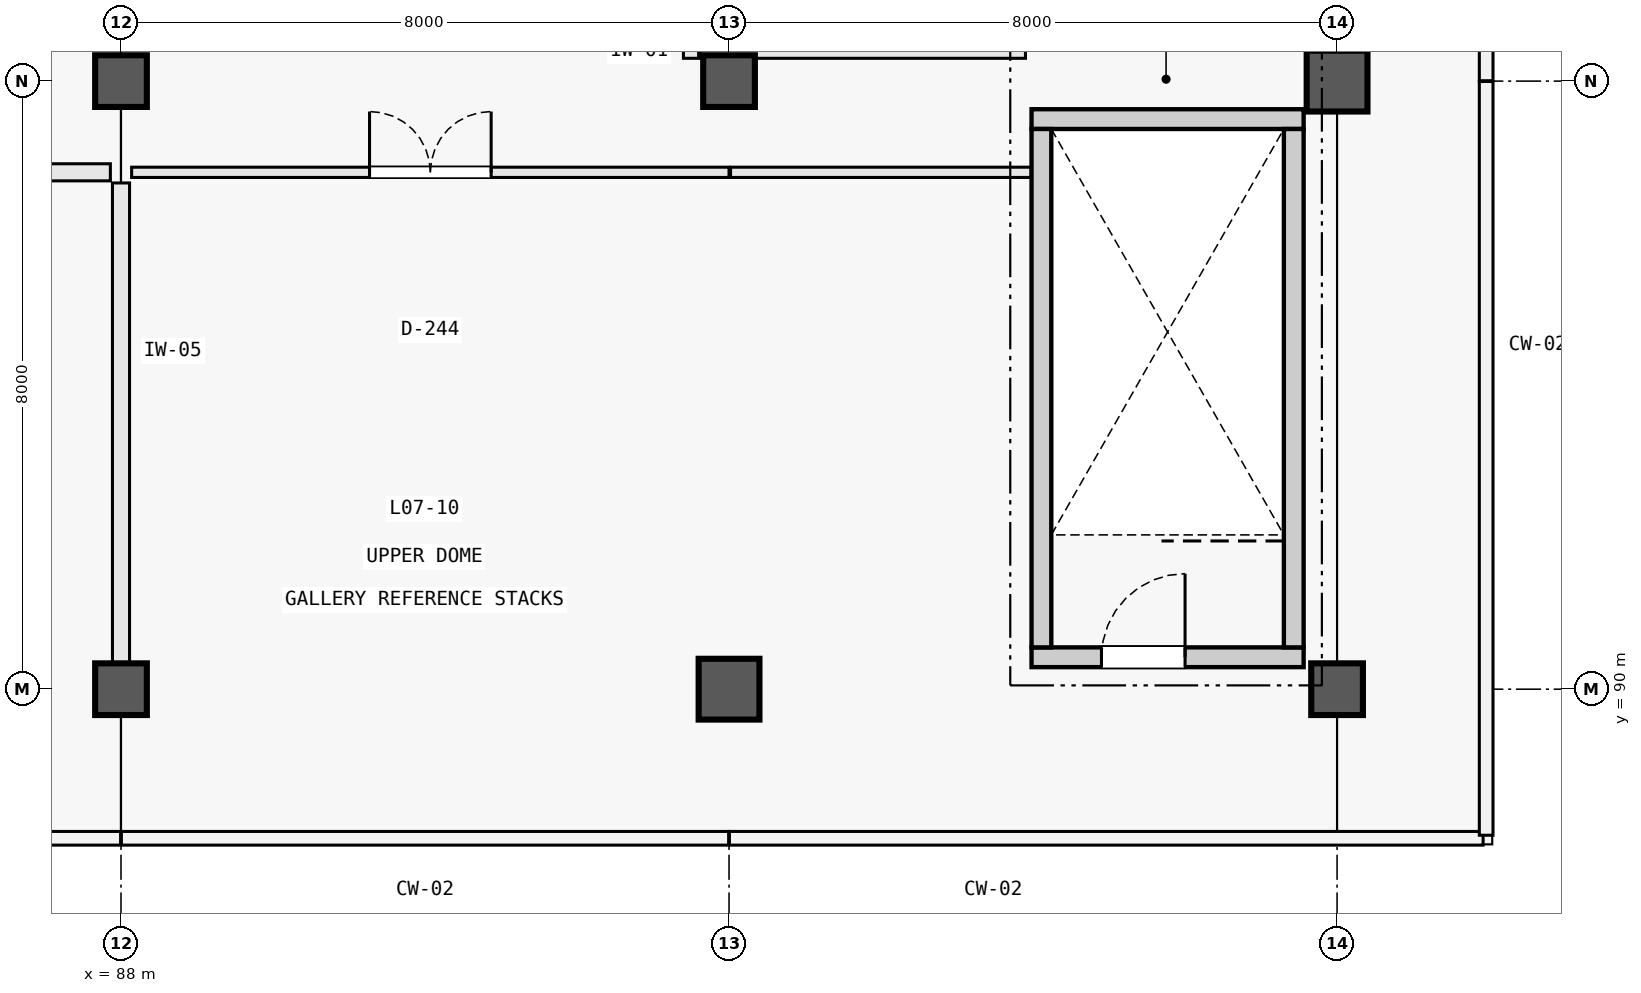
"""IFC4 building model, lengths in metres.
Left out: names, types, materials, properties, quantities, classifications, styles, units other than length and angle.
Written with IfcOpenShell. Run it as: python <this file> out.ifc"""

import sys

from ifc_helpers import new_model, si_unit, direction, frame, frame_2d, origin, origin_2d, place, context, subcontext, project, spatial, rectangle, circle, extrude, element, fill, save


model = new_model("IFC4")
c1 = context("Model", 3, precision=1e-05, world=origin(), true_north=direction((0.0, 1.0)))
c2 = subcontext(c1, "Body", "Model", "MODEL_VIEW")
j1 = project(units=[si_unit("LENGTHUNIT", "METRE"), si_unit("PLANEANGLEUNIT", "RADIAN")], contexts=[c1])
p1 = place(None, origin())
s1 = spatial("IfcSite", under=j1, at=p1, CompositionType="ELEMENT")
p2 = place(p1, origin())
s2 = spatial("IfcBuilding", under=s1, at=p2, CompositionType="ELEMENT")
p3 = place(p2, frame((0.0, 0.0, 30.3)))
s3 = spatial("IfcBuildingStorey", under=s2, at=p3, CompositionType="ELEMENT", Elevation=30.3)
for number, where, z_axis, x_axis in (
    (1, (88.0, 90.0, 0.0), (0.0, 0.0, 1.0), (1.0, 0.0, 0.0)),
    (2, (88.0, 98.0, 0.0), (0.0, 0.0, 1.0), (1.0, 0.0, 0.0)),
):
    element("IfcColumn", number, at=place(p3, frame(where, z_axis=z_axis, x_axis=x_axis)), inside=s3, PredefinedType="COLUMN", context=c2, shape_type="SweptSolid", body=[
        extrude(circle(Radius=0.34, at=origin_2d()), origin(), (0.0, 0.0, 1.0), 4.5),
    ])
p4 = place(p3, frame((96.0, 90.0, 0.0), z_axis=(0.0, 0.0, 1.0), x_axis=(1.0, 0.0, 0.0)))
e3 = element("IfcColumn", 3, at=p4, inside=s3, PredefinedType="COLUMN", context=c2, shape_type="SweptSolid", body=[
    extrude(rectangle(XDim=0.8, YDim=0.8, at=origin_2d()), origin(), (0.0, 0.0, 1.0), 4.5),
])
for number, where, z_axis, x_axis in (
    (4, (96.0, 98.0, 0.0), (0.0, 0.0, 1.0), (1.0, 0.0, 0.0)),
    (5, (104.0, 90.0, 0.0), (0.0, 0.0, 1.0), (1.0, 0.0, 0.0)),
):
    element("IfcColumn", number, at=place(p3, frame(where, z_axis=z_axis, x_axis=x_axis)), inside=s3, PredefinedType="COLUMN", context=c2, shape_type="SweptSolid", body=[
        extrude(circle(Radius=0.34, at=origin_2d()), origin(), (0.0, 0.0, 1.0), 4.5),
    ])
p5 = place(p3, frame((104.0, 98.0, 0.0), z_axis=(0.0, 0.0, 1.0), x_axis=(1.0, 0.0, 0.0)))
e6 = element("IfcColumn", 6, at=p5, inside=s3, PredefinedType="COLUMN", context=c2, shape_type="SweptSolid", body=[
    extrude(rectangle(XDim=0.8, YDim=0.8, at=origin_2d()), origin(), (0.0, 0.0, 1.0), 4.5),
])
p6 = place(p3, frame((99.98, 90.42, 0.0), z_axis=(0.0, 0.0, 1.0), x_axis=(1.0, 0.0, 0.0)))
e7 = element("IfcWall", 7, at=p6, inside=s3, PredefinedType="SOLIDWALL", context=c2, shape_type="SweptSolid", body=[
    extrude(rectangle(XDim=3.58, YDim=0.26, at=frame_2d((1.79, 0.0))), origin(), (0.0, 0.0, 1.0), 4.5),
])
p7 = place(p6, frame((0.92, 0.0, 0.0)))
e8 = element("IfcOpeningElement", 8, at=p7, cuts=e7, PredefinedType="OPENING", context=c2, shape_type="SweptSolid", body=[
    extrude(rectangle(XDim=1.1, YDim=2.2, at=frame_2d((0.55, 1.1))), frame((0.0, 0.142, 0.0), z_axis=(0.0, -1.0, 0.0), x_axis=(1.0, 0.0, 0.0)), (0.0, 0.0, 1.0), 0.284),
])
p8 = place(p3, frame((99.98, 97.5, 0.0), z_axis=(0.0, 0.0, 1.0), x_axis=(1.0, 0.0, 0.0)))
e9 = element("IfcWall", 9, at=p8, inside=s3, PredefinedType="SOLIDWALL", context=c2, shape_type="SweptSolid", body=[
    extrude(rectangle(XDim=3.58, YDim=0.26, at=frame_2d((1.79, 0.0))), origin(), (0.0, 0.0, 1.0), 4.5),
])
for number, where, z_axis, x_axis in (
    (10, (100.11, 90.55, 0.0), (0.0, 0.0, 1.0), (0.0, 1.0, 0.0)),
    (11, (103.43, 90.55, 0.0), (0.0, 0.0, 1.0), (0.0, 1.0, 0.0)),
):
    element("IfcWall", number, at=place(p3, frame(where, z_axis=z_axis, x_axis=x_axis)), inside=s3, PredefinedType="SOLIDWALL", context=c2, shape_type="SweptSolid", body=[
        extrude(rectangle(XDim=6.82, YDim=0.26, at=frame_2d((3.41, 0.0))), origin(), (0.0, 0.0, 1.0), 4.5),
    ])
p9 = place(p3, frame((95.62, 98.4, 0.0), z_axis=(0.0, 0.0, 1.0), x_axis=(1.0, 0.0, 0.0)))
e12 = element("IfcWall", 12, at=p9, inside=s3, PredefinedType="PARTITIONING", context=c2, shape_type="SweptSolid", body=[
    extrude(rectangle(XDim=4.28, YDim=0.2, at=frame_2d((2.14, 0.0))), origin(), (0.0, 0.0, 1.0), 3.28),
])
p10 = place(p3, frame((95.5, 98.3, 0.0), z_axis=(0.0, 0.0, 1.0), x_axis=(0.0, 1.0, 0.0)))
e13 = element("IfcWall", 13, at=p10, inside=s3, PredefinedType="PARTITIONING", context=c2, shape_type="SweptSolid", body=[
    extrude(rectangle(XDim=4.4, YDim=0.2, at=frame_2d((2.2, 0.0))), origin(), (0.0, 0.0, 1.0), 3.28),
])
p11 = place(p10, frame((1.62, 0.0, 0.0)))
e14 = element("IfcOpeningElement", 14, at=p11, cuts=e13, PredefinedType="OPENING", context=c2, shape_type="SweptSolid", body=[
    extrude(rectangle(XDim=1.8, YDim=2.25, at=frame_2d((0.9, 1.125))), frame((0.0, 0.112, 0.0), z_axis=(0.0, -1.0, 0.0), x_axis=(1.0, 0.0, 0.0)), (0.0, 0.0, 1.0), 0.224),
])
p12 = place(p3, frame((88.0, 90.35, 0.0), z_axis=(0.0, 0.0, 1.0), x_axis=(0.0, 1.0, 0.0)))
e15 = element("IfcWall", 15, at=p12, inside=s3, PredefinedType="PARTITIONING", context=c2, shape_type="SweptSolid", body=[
    extrude(rectangle(XDim=6.31, YDim=0.225, at=frame_2d((3.155, 0.0))), origin(), (0.0, 0.0, 1.0), 3.11),
])
p13 = place(p3, frame((80.14, 96.8, 0.0), z_axis=(0.0, 0.0, 1.0), x_axis=(1.0, 0.0, 0.0)))
e16 = element("IfcWall", 16, at=p13, inside=s3, PredefinedType="PARTITIONING", context=c2, shape_type="SweptSolid", body=[
    extrude(rectangle(XDim=7.72, YDim=0.225, at=frame_2d((3.86, 0.0))), origin(), (0.0, 0.0, 1.0), 3.11),
])
p14 = place(p13, frame((2.113, 0.0, 0.0)))
e17 = element("IfcOpeningElement", 17, at=p14, cuts=e16, PredefinedType="OPENING", context=c2, shape_type="SweptSolid", body=[
    extrude(rectangle(XDim=0.92, YDim=2.1, at=frame_2d((0.46, 1.05))), frame((0.0, 0.125, 0.0), z_axis=(0.0, -1.0, 0.0), x_axis=(1.0, 0.0, 0.0)), (0.0, 0.0, 1.0), 0.249),
])
p15 = place(p13, frame((4.687, 0.0, 0.0)))
e18 = element("IfcOpeningElement", 18, at=p15, cuts=e16, PredefinedType="OPENING", context=c2, shape_type="SweptSolid", body=[
    extrude(rectangle(XDim=0.92, YDim=2.1, at=frame_2d((0.46, 1.05))), frame((0.0, 0.125, 0.0), z_axis=(0.0, -1.0, 0.0), x_axis=(1.0, 0.0, 0.0)), (0.0, 0.0, 1.0), 0.249),
])
p16 = place(p3, frame((88.14, 96.8, 0.0), z_axis=(0.0, 0.0, 1.0), x_axis=(1.0, 0.0, 0.0)))
e19 = element("IfcWall", 19, at=p16, inside=s3, PredefinedType="PARTITIONING", context=c2, shape_type="SweptSolid", body=[
    extrude(rectangle(XDim=7.86, YDim=0.135, at=frame_2d((3.93, 0.0))), origin(), (0.0, 0.0, 1.0), 3.11),
])
p17 = place(p16, frame((3.13, 0.0, 0.0)))
e20 = element("IfcOpeningElement", 20, at=p17, cuts=e19, PredefinedType="OPENING", context=c2, shape_type="SweptSolid", body=[
    extrude(rectangle(XDim=1.6, YDim=2.2, at=frame_2d((0.8, 1.1))), frame((0.0, 0.08, 0.0), z_axis=(0.0, -1.0, 0.0), x_axis=(1.0, 0.0, 0.0)), (0.0, 0.0, 1.0), 0.159),
])
p18 = place(p3, frame((96.02, 96.8, 0.0), z_axis=(0.0, 0.0, 1.0), x_axis=(1.0, 0.0, 0.0)))
e21 = element("IfcWall", 21, at=p18, inside=s3, PredefinedType="PARTITIONING", context=c2, shape_type="SweptSolid", body=[
    extrude(rectangle(XDim=3.95, YDim=0.135, at=frame_2d((1.975, 0.0))), origin(), (0.0, 0.0, 1.0), 3.11),
])
p19 = place(p7, origin())
e22 = element("IfcDoor", 22, at=p19, inside=s3, OperationType="SINGLE_SWING_RIGHT", PredefinedType="DOOR", context=c2, shape_type="SweptSolid", body=[
    extrude(rectangle(XDim=1.1, YDim=2.2, at=frame_2d((0.55, 1.1))), frame((0.0, 0.025, 0.0), z_axis=(0.0, -1.0, 0.0), x_axis=(1.0, 0.0, 0.0)), (0.0, 0.0, 1.0), 0.05),
])
fill(e8, e22)
p20 = place(p17, origin())
e23 = element("IfcDoor", 23, at=p20, inside=s3, OperationType="DOUBLE_DOOR_SINGLE_SWING", PredefinedType="DOOR", context=c2, shape_type="SweptSolid", body=[
    extrude(rectangle(XDim=1.6, YDim=2.2, at=frame_2d((0.8, 1.1))), frame((0.0, 0.025, 0.0), z_axis=(0.0, -1.0, 0.0), x_axis=(1.0, 0.0, 0.0)), (0.0, 0.0, 1.0), 0.05),
])
fill(e20, e23)
save(model, sys.argv[1])
